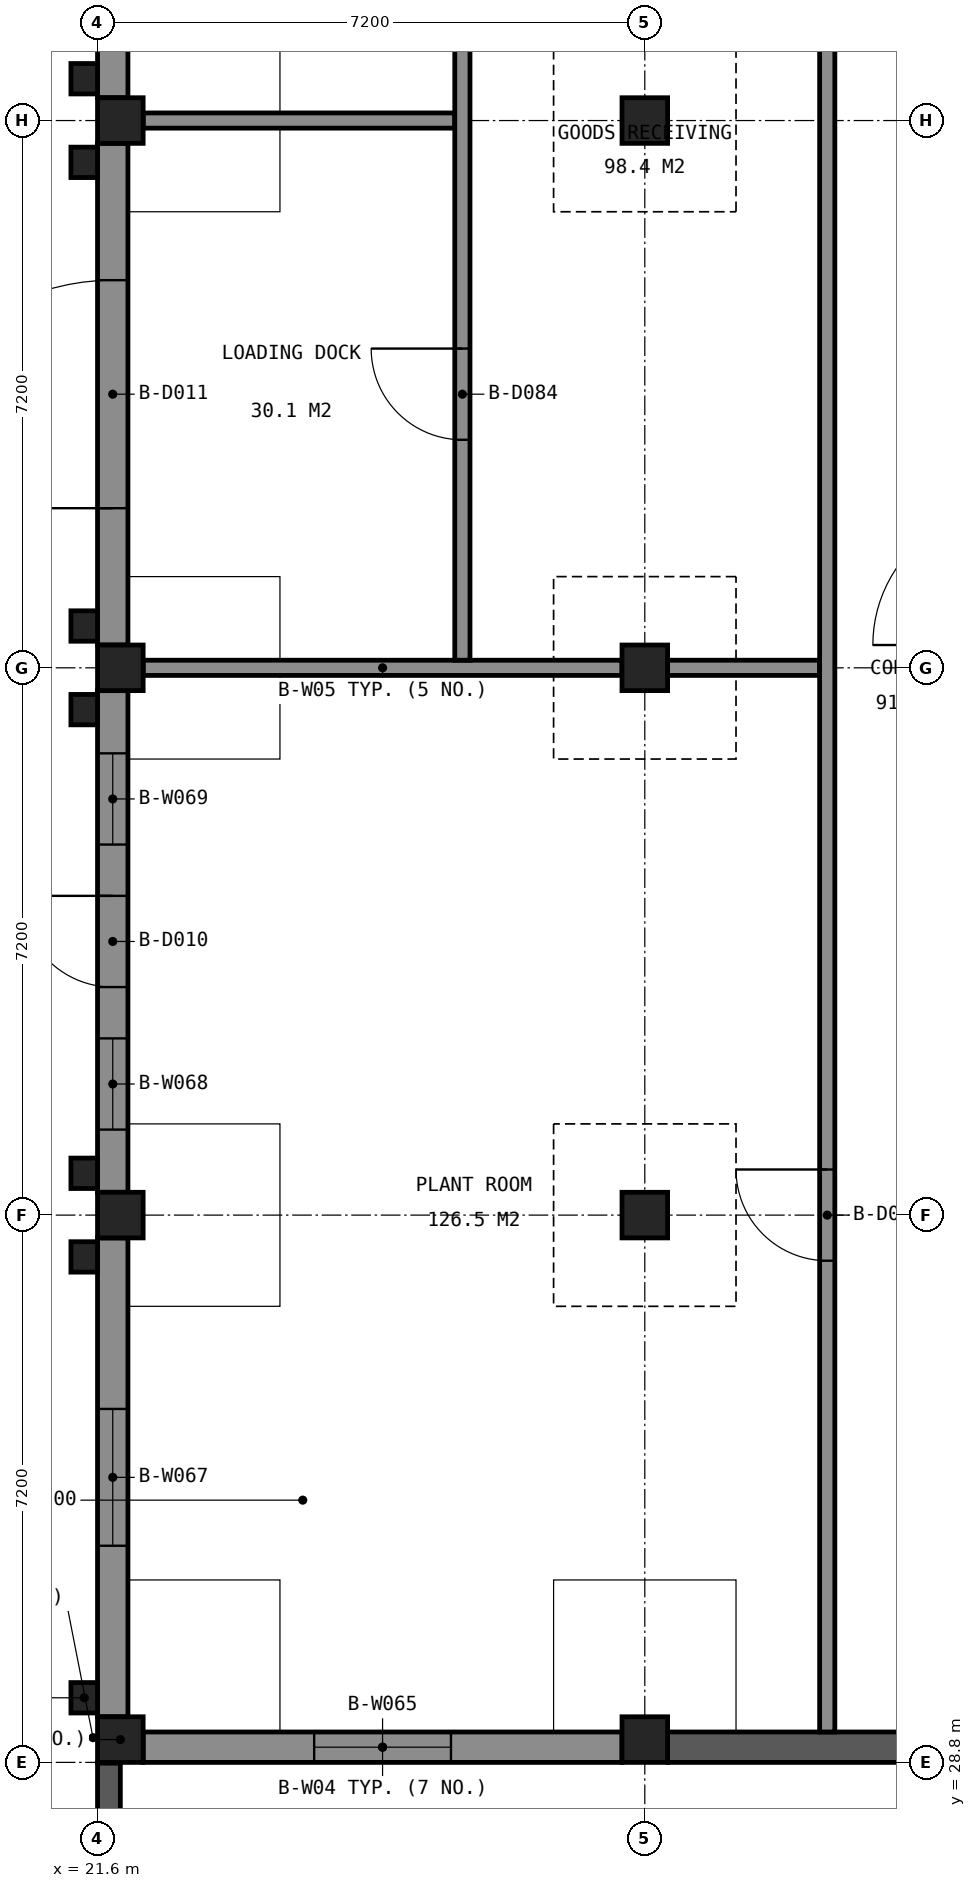
"""IFC4 building model, lengths in metres.
Left out: names, types, materials, properties, quantities, classifications, styles, units other than length and angle.
Written with IfcOpenShell. Run it as: python <this file> out.ifc"""

import sys

from ifc_helpers import new_model, si_unit, direction, frame, frame_2d, origin, origin_2d, place, context, subcontext, project, spatial, rectangle, extrude, element, fill, save


model = new_model("IFC4")
c1 = context("Model", 3, precision=1e-05, world=origin(), true_north=direction((0.0, 1.0)))
c2 = subcontext(c1, "Body", "Model", "MODEL_VIEW")
j1 = project(units=[si_unit("LENGTHUNIT", "METRE"), si_unit("PLANEANGLEUNIT", "RADIAN")], contexts=[c1])
p1 = place(None, origin())
s1 = spatial("IfcSite", under=j1, at=p1, CompositionType="ELEMENT")
p2 = place(p1, origin())
s2 = spatial("IfcBuilding", under=s1, at=p2, CompositionType="ELEMENT")
p3 = place(p2, origin())
s3 = spatial("IfcBuildingStorey", under=s2, at=p3, CompositionType="ELEMENT", Elevation=0.0)
for number, where, z_axis, x_axis in (
    (1, (21.9, 29.1, 0.0), (0.0, 0.0, 1.0), (1.0, 0.0, 0.0)),
    (2, (21.9, 36.0, 0.0), (0.0, 0.0, 1.0), (1.0, 0.0, 0.0)),
    (3, (21.9, 43.2, 0.0), (0.0, 0.0, 1.0), (1.0, 0.0, 0.0)),
    (4, (21.9, 50.4, 0.0), (0.0, 0.0, 1.0), (1.0, 0.0, 0.0)),
    (5, (28.8, 29.1, 0.0), (0.0, 0.0, 1.0), (1.0, 0.0, 0.0)),
    (6, (28.8, 36.0, 0.0), (0.0, 0.0, 1.0), (1.0, 0.0, 0.0)),
    (7, (28.8, 43.2, 0.0), (0.0, 0.0, 1.0), (1.0, 0.0, 0.0)),
    (8, (28.8, 50.4, 0.0), (0.0, 0.0, 1.0), (1.0, 0.0, 0.0)),
):
    element("IfcColumn", number, at=place(p3, frame(where, z_axis=z_axis, x_axis=x_axis)), inside=s3, PredefinedType="COLUMN", context=c2, shape_type="SweptSolid", body=[
        extrude(rectangle(XDim=0.6, YDim=0.6, at=origin_2d()), origin(), (0.0, 0.0, 1.0), 4.8),
    ])
p4 = place(p3, frame((29.1, 29.0, 0.0), z_axis=(0.0, 0.0, 1.0), x_axis=(1.0, 0.0, 0.0)))
e9 = element("IfcWall", 9, at=p4, inside=s3, PredefinedType="SHEAR", context=c2, shape_type="SweptSolid", body=[
    extrude(rectangle(XDim=13.7, YDim=0.4, at=frame_2d((6.85, 0.0))), origin(), (0.0, 0.0, 1.0), 4.55),
])
p5 = place(p3, frame((21.75, 21.6, -0.25), z_axis=(0.0, 0.0, 1.0), x_axis=(0.0, 1.0, 0.0)))
e10 = element("IfcWall", 10, at=p5, inside=s3, PredefinedType="SOLIDWALL", context=c2, shape_type="SweptSolid", body=[
    extrude(rectangle(XDim=7.19, YDim=0.3, at=frame_2d((3.595, 0.0))), origin(), (0.0, 0.0, 1.0), 6.15),
])
p6 = place(p3, frame((22.2, 29.0, 0.0), z_axis=(0.0, 0.0, 1.0), x_axis=(1.0, 0.0, 0.0)))
e11 = element("IfcWall", 11, at=p6, inside=s3, PredefinedType="SOLIDWALL", context=c2, shape_type="SweptSolid", body=[
    extrude(rectangle(XDim=6.3, YDim=0.4, at=frame_2d((3.15, 0.0))), origin(), (0.0, 0.0, 1.0), 3.95),
])
p7 = place(p6, frame((2.25, 0.0, 2.0)))
e12 = element("IfcOpeningElement", 12, at=p7, cuts=e11, PredefinedType="OPENING", context=c2, shape_type="SweptSolid", body=[
    extrude(rectangle(XDim=1.8, YDim=1.5, at=frame_2d((0.9, 0.75))), frame((0.0, 0.21, 0.0), z_axis=(0.0, -1.0, 0.0), x_axis=(1.0, 0.0, 0.0)), (0.0, 0.0, 1.0), 0.42),
])
p8 = place(p3, frame((21.8, 29.4, 0.0), z_axis=(0.0, 0.0, 1.0), x_axis=(0.0, 1.0, 0.0)))
e13 = element("IfcWall", 13, at=p8, inside=s3, PredefinedType="SOLIDWALL", context=c2, shape_type="SweptSolid", body=[
    extrude(rectangle(XDim=6.3, YDim=0.4, at=frame_2d((3.15, 0.0))), origin(), (0.0, 0.0, 1.0), 3.95),
])
p9 = place(p8, frame((2.25, 0.0, 2.0)))
e14 = element("IfcOpeningElement", 14, at=p9, cuts=e13, PredefinedType="OPENING", context=c2, shape_type="SweptSolid", body=[
    extrude(rectangle(XDim=1.8, YDim=1.5, at=frame_2d((0.9, 0.75))), frame((0.0, 0.21, 0.0), z_axis=(0.0, -1.0, 0.0), x_axis=(1.0, 0.0, 0.0)), (0.0, 0.0, 1.0), 0.42),
])
p10 = place(p3, frame((21.8, 36.3, 0.0), z_axis=(0.0, 0.0, 1.0), x_axis=(0.0, 1.0, 0.0)))
e15 = element("IfcWall", 15, at=p10, inside=s3, PredefinedType="SOLIDWALL", context=c2, shape_type="SweptSolid", body=[
    extrude(rectangle(XDim=6.6, YDim=0.4, at=frame_2d((3.3, 0.0))), origin(), (0.0, 0.0, 1.0), 3.95),
])
p11 = place(p10, frame((2.7, 0.0, 0.0)))
e16 = element("IfcOpeningElement", 16, at=p11, cuts=e15, PredefinedType="OPENING", context=c2, shape_type="SweptSolid", body=[
    extrude(rectangle(XDim=1.2, YDim=2.1, at=frame_2d((0.6, 1.05))), frame((0.0, 0.21, 0.0), z_axis=(0.0, -1.0, 0.0), x_axis=(1.0, 0.0, 0.0)), (0.0, 0.0, 1.0), 0.42),
])
p12 = place(p10, frame((0.825, 0.0, 2.0)))
e17 = element("IfcOpeningElement", 17, at=p12, cuts=e15, PredefinedType="OPENING", context=c2, shape_type="SweptSolid", body=[
    extrude(rectangle(XDim=1.2, YDim=1.5, at=frame_2d((0.6, 0.75))), frame((0.0, 0.21, 0.0), z_axis=(0.0, -1.0, 0.0), x_axis=(1.0, 0.0, 0.0)), (0.0, 0.0, 1.0), 0.42),
])
p13 = place(p10, frame((4.575, 0.0, 2.0)))
e18 = element("IfcOpeningElement", 18, at=p13, cuts=e15, PredefinedType="OPENING", context=c2, shape_type="SweptSolid", body=[
    extrude(rectangle(XDim=1.2, YDim=1.5, at=frame_2d((0.6, 0.75))), frame((0.0, 0.21, 0.0), z_axis=(0.0, -1.0, 0.0), x_axis=(1.0, 0.0, 0.0)), (0.0, 0.0, 1.0), 0.42),
])
p14 = place(p3, frame((21.8, 43.5, 0.0), z_axis=(0.0, 0.0, 1.0), x_axis=(0.0, 1.0, 0.0)))
e19 = element("IfcWall", 19, at=p14, inside=s3, PredefinedType="SOLIDWALL", context=c2, shape_type="SweptSolid", body=[
    extrude(rectangle(XDim=6.6, YDim=0.4, at=frame_2d((3.3, 0.0))), origin(), (0.0, 0.0, 1.0), 3.95),
])
p15 = place(p14, frame((1.8, 0.0, 0.0)))
e20 = element("IfcOpeningElement", 20, at=p15, cuts=e19, PredefinedType="OPENING", context=c2, shape_type="SweptSolid", body=[
    extrude(rectangle(XDim=3.0, YDim=3.0, at=frame_2d((1.5, 1.5))), frame((0.0, 0.21, 0.0), z_axis=(0.0, -1.0, 0.0), x_axis=(1.0, 0.0, 0.0)), (0.0, 0.0, 1.0), 0.42),
])
p16 = place(p3, frame((21.8, 50.7, 0.0), z_axis=(0.0, 0.0, 1.0), x_axis=(0.0, 1.0, 0.0)))
e21 = element("IfcWall", 21, at=p16, inside=s3, PredefinedType="SOLIDWALL", context=c2, shape_type="SweptSolid", body=[
    extrude(rectangle(XDim=6.6, YDim=0.4, at=frame_2d((3.3, 0.0))), origin(), (0.0, 0.0, 1.0), 3.95),
])
p17 = place(p16, frame((1.8, 0.0, 0.0)))
e22 = element("IfcOpeningElement", 22, at=p17, cuts=e21, PredefinedType="OPENING", context=c2, shape_type="SweptSolid", body=[
    extrude(rectangle(XDim=3.0, YDim=3.0, at=frame_2d((1.5, 1.5))), frame((0.0, 0.21, 0.0), z_axis=(0.0, -1.0, 0.0), x_axis=(1.0, 0.0, 0.0)), (0.0, 0.0, 1.0), 0.42),
])
for number, where, z_axis, x_axis in (
    (23, (21.425, 29.65, -0.25), (0.0, 0.0, 1.0), (1.0, 0.0, 0.0)),
    (24, (21.425, 35.45, -0.25), (0.0, 0.0, 1.0), (1.0, 0.0, 0.0)),
    (25, (21.425, 36.55, -0.25), (0.0, 0.0, 1.0), (1.0, 0.0, 0.0)),
    (26, (21.425, 42.65, -0.25), (0.0, 0.0, 1.0), (1.0, 0.0, 0.0)),
    (27, (21.425, 43.75, -0.25), (0.0, 0.0, 1.0), (1.0, 0.0, 0.0)),
    (28, (21.425, 49.85, -0.25), (0.0, 0.0, 1.0), (1.0, 0.0, 0.0)),
    (29, (21.425, 50.95, -0.25), (0.0, 0.0, 1.0), (1.0, 0.0, 0.0)),
):
    element("IfcColumn", number, at=place(p3, frame(where, z_axis=z_axis, x_axis=x_axis)), inside=s3, PredefinedType="COLUMN", context=c2, shape_type="SweptSolid", body=[
        extrude(rectangle(XDim=0.35, YDim=0.4, at=origin_2d()), origin(), (0.0, 0.0, 1.0), 5.05),
    ])
p18 = place(p3, frame((21.54, 28.8, 0.0), z_axis=(0.0, 0.0, 1.0), x_axis=(0.0, 1.0, 0.0)))
e30 = element("IfcWall", 30, at=p18, inside=s3, PredefinedType="SOLIDWALL", context=c2, shape_type="SweptSolid", body=[
    extrude(rectangle(XDim=0.65, YDim=0.12, at=frame_2d((0.325, 0.0))), origin(), (0.0, 0.0, 1.0), 0.6),
])
p19 = place(p3, frame((21.54, 29.85, 0.0), z_axis=(0.0, 0.0, 1.0), x_axis=(0.0, 1.0, 0.0)))
e31 = element("IfcWall", 31, at=p19, inside=s3, PredefinedType="SOLIDWALL", context=c2, shape_type="SweptSolid", body=[
    extrude(rectangle(XDim=5.4, YDim=0.12, at=frame_2d((2.7, 0.0))), origin(), (0.0, 0.0, 1.0), 0.6),
])
p20 = place(p3, frame((21.54, 35.65, 0.0), z_axis=(0.0, 0.0, 1.0), x_axis=(0.0, 1.0, 0.0)))
e32 = element("IfcWall", 32, at=p20, inside=s3, PredefinedType="SOLIDWALL", context=c2, shape_type="SweptSolid", body=[
    extrude(rectangle(XDim=0.7, YDim=0.12, at=frame_2d((0.35, 0.0))), origin(), (0.0, 0.0, 1.0), 0.6),
])
for number, where, z_axis, x_axis in (
    (33, (21.54, 36.75, 0.0), (0.0, 0.0, 1.0), (0.0, 1.0, 0.0)),
    (34, (21.54, 40.3, 0.0), (0.0, 0.0, 1.0), (0.0, 1.0, 0.0)),
):
    element("IfcWall", number, at=place(p3, frame(where, z_axis=z_axis, x_axis=x_axis)), inside=s3, PredefinedType="SOLIDWALL", context=c2, shape_type="SweptSolid", body=[
        extrude(rectangle(XDim=2.15, YDim=0.12, at=frame_2d((1.075, 0.0))), origin(), (0.0, 0.0, 1.0), 0.6),
    ])
p21 = place(p3, frame((21.54, 42.85, 0.0), z_axis=(0.0, 0.0, 1.0), x_axis=(0.0, 1.0, 0.0)))
e35 = element("IfcWall", 35, at=p21, inside=s3, PredefinedType="SOLIDWALL", context=c2, shape_type="SweptSolid", body=[
    extrude(rectangle(XDim=0.7, YDim=0.12, at=frame_2d((0.35, 0.0))), origin(), (0.0, 0.0, 1.0), 0.6),
])
for number, where, z_axis, x_axis in (
    (36, (21.54, 43.95, 0.0), (0.0, 0.0, 1.0), (0.0, 1.0, 0.0)),
    (37, (21.54, 48.4, 0.0), (0.0, 0.0, 1.0), (0.0, 1.0, 0.0)),
):
    element("IfcWall", number, at=place(p3, frame(where, z_axis=z_axis, x_axis=x_axis)), inside=s3, PredefinedType="SOLIDWALL", context=c2, shape_type="SweptSolid", body=[
        extrude(rectangle(XDim=1.25, YDim=0.12, at=frame_2d((0.625, 0.0))), origin(), (0.0, 0.0, 1.0), 0.6),
    ])
p22 = place(p3, frame((21.54, 50.05, 0.0), z_axis=(0.0, 0.0, 1.0), x_axis=(0.0, 1.0, 0.0)))
e38 = element("IfcWall", 38, at=p22, inside=s3, PredefinedType="SOLIDWALL", context=c2, shape_type="SweptSolid", body=[
    extrude(rectangle(XDim=0.7, YDim=0.12, at=frame_2d((0.35, 0.0))), origin(), (0.0, 0.0, 1.0), 0.6),
])
p23 = place(p3, frame((21.54, 51.15, 0.0), z_axis=(0.0, 0.0, 1.0), x_axis=(0.0, 1.0, 0.0)))
e39 = element("IfcWall", 39, at=p23, inside=s3, PredefinedType="SOLIDWALL", context=c2, shape_type="SweptSolid", body=[
    extrude(rectangle(XDim=1.25, YDim=0.12, at=frame_2d((0.625, 0.0))), origin(), (0.0, 0.0, 1.0), 0.6),
])
p24 = place(p3, frame((22.2, 43.2, 0.0), z_axis=(0.0, 0.0, 1.0), x_axis=(1.0, 0.0, 0.0)))
e40 = element("IfcWall", 40, at=p24, inside=s3, PredefinedType="PARTITIONING", context=c2, shape_type="SweptSolid", body=[
    extrude(rectangle(XDim=6.3, YDim=0.2, at=frame_2d((3.15, 0.0))), origin(), (0.0, 0.0, 1.0), 3.95),
])
p25 = place(p3, frame((29.1, 43.2, 0.0), z_axis=(0.0, 0.0, 1.0), x_axis=(1.0, 0.0, 0.0)))
e41 = element("IfcWall", 41, at=p25, inside=s3, PredefinedType="PARTITIONING", context=c2, shape_type="SweptSolid", body=[
    extrude(rectangle(XDim=2.0, YDim=0.2, at=frame_2d((1.0, 0.0))), origin(), (0.0, 0.0, 1.0), 3.95),
])
p26 = place(p3, frame((22.2, 50.4, 0.0), z_axis=(0.0, 0.0, 1.0), x_axis=(1.0, 0.0, 0.0)))
e42 = element("IfcWall", 42, at=p26, inside=s3, PredefinedType="PARTITIONING", context=c2, shape_type="SweptSolid", body=[
    extrude(rectangle(XDim=4.1, YDim=0.2, at=frame_2d((2.05, 0.0))), origin(), (0.0, 0.0, 1.0), 3.95),
])
p27 = place(p3, frame((26.4, 43.3, 0.0), z_axis=(0.0, 0.0, 1.0), x_axis=(0.0, 1.0, 0.0)))
e43 = element("IfcWall", 43, at=p27, inside=s3, PredefinedType="PARTITIONING", context=c2, shape_type="SweptSolid", body=[
    extrude(rectangle(XDim=21.4, YDim=0.2, at=frame_2d((10.7, 0.0))), origin(), (0.0, 0.0, 1.0), 3.95),
])
p28 = place(p27, frame((2.9, 0.0, 0.0)))
e44 = element("IfcOpeningElement", 44, at=p28, cuts=e43, PredefinedType="OPENING", context=c2, shape_type="SweptSolid", body=[
    extrude(rectangle(XDim=1.2, YDim=2.1, at=frame_2d((0.6, 1.05))), frame((0.0, 0.11, 0.0), z_axis=(0.0, -1.0, 0.0), x_axis=(1.0, 0.0, 0.0)), (0.0, 0.0, 1.0), 0.22),
])
p29 = place(p27, frame((10.1, 0.0, 0.0)))
e45 = element("IfcOpeningElement", 45, at=p29, cuts=e43, PredefinedType="OPENING", context=c2, shape_type="SweptSolid", body=[
    extrude(rectangle(XDim=1.2, YDim=2.1, at=frame_2d((0.6, 1.05))), frame((0.0, 0.11, 0.0), z_axis=(0.0, -1.0, 0.0), x_axis=(1.0, 0.0, 0.0)), (0.0, 0.0, 1.0), 0.22),
])
p30 = place(p27, frame((17.3, 0.0, 0.0)))
e46 = element("IfcOpeningElement", 46, at=p30, cuts=e43, PredefinedType="OPENING", context=c2, shape_type="SweptSolid", body=[
    extrude(rectangle(XDim=1.2, YDim=2.1, at=frame_2d((0.6, 1.05))), frame((0.0, 0.11, 0.0), z_axis=(0.0, -1.0, 0.0), x_axis=(1.0, 0.0, 0.0)), (0.0, 0.0, 1.0), 0.22),
])
p31 = place(p3, frame((31.2, 29.2, 0.0), z_axis=(0.0, 0.0, 1.0), x_axis=(0.0, 1.0, 0.0)))
e47 = element("IfcWall", 47, at=p31, inside=s3, PredefinedType="PARTITIONING", context=c2, shape_type="SweptSolid", body=[
    extrude(rectangle(XDim=42.4, YDim=0.2, at=frame_2d((21.2, 0.0))), origin(), (0.0, 0.0, 1.0), 3.95),
])
p32 = place(p31, frame((6.2, 0.0, 0.0)))
e48 = element("IfcOpeningElement", 48, at=p32, cuts=e47, PredefinedType="OPENING", context=c2, shape_type="SweptSolid", body=[
    extrude(rectangle(XDim=1.2, YDim=2.1, at=frame_2d((0.6, 1.05))), frame((0.0, 0.11, 0.0), z_axis=(0.0, -1.0, 0.0), x_axis=(1.0, 0.0, 0.0)), (0.0, 0.0, 1.0), 0.22),
])
p33 = place(p31, frame((23.9, 0.0, 0.0)))
e49 = element("IfcOpeningElement", 49, at=p33, cuts=e47, PredefinedType="OPENING", context=c2, shape_type="SweptSolid", body=[
    extrude(rectangle(XDim=1.8, YDim=2.1, at=frame_2d((0.9, 1.05))), frame((0.0, 0.11, 0.0), z_axis=(0.0, -1.0, 0.0), x_axis=(1.0, 0.0, 0.0)), (0.0, 0.0, 1.0), 0.22),
])
p34 = place(p31, frame((38.7, 0.0, 0.0)))
e50 = element("IfcOpeningElement", 50, at=p34, cuts=e47, PredefinedType="OPENING", context=c2, shape_type="SweptSolid", body=[
    extrude(rectangle(XDim=1.0, YDim=2.1, at=frame_2d((0.5, 1.05))), frame((0.0, 0.11, 0.0), z_axis=(0.0, -1.0, 0.0), x_axis=(1.0, 0.0, 0.0)), (0.0, 0.0, 1.0), 0.22),
])
p35 = place(p11, origin())
e51 = element("IfcDoor", 51, at=p35, inside=s3, OperationType="SINGLE_SWING_RIGHT", PredefinedType="DOOR", context=c2, shape_type="SweptSolid", body=[
    extrude(rectangle(XDim=1.2, YDim=2.1, at=frame_2d((0.6, 1.05))), frame((0.0, 0.025, 0.0), z_axis=(0.0, -1.0, 0.0), x_axis=(1.0, 0.0, 0.0)), (0.0, 0.0, 1.0), 0.05),
])
fill(e16, e51)
p36 = place(p15, origin())
e52 = element("IfcDoor", 52, at=p36, inside=s3, OperationType="ROLLINGUP", PredefinedType="DOOR", context=c2, shape_type="SweptSolid", body=[
    extrude(rectangle(XDim=3.0, YDim=3.0, at=frame_2d((1.5, 1.5))), frame((0.0, 0.025, 0.0), z_axis=(0.0, -1.0, 0.0), x_axis=(1.0, 0.0, 0.0)), (0.0, 0.0, 1.0), 0.05),
])
fill(e20, e52)
p37 = place(p7, origin())
e53 = element("IfcWindow", 53, at=p37, inside=s3, PartitioningType="SINGLE_PANEL", PredefinedType="WINDOW", context=c2, shape_type="SweptSolid", body=[
    extrude(rectangle(XDim=1.8, YDim=1.5, at=frame_2d((0.9, 0.75))), frame((0.0, 0.03, 0.0), z_axis=(0.0, -1.0, 0.0), x_axis=(1.0, 0.0, 0.0)), (0.0, 0.0, 1.0), 0.06),
])
fill(e12, e53)
p38 = place(p9, origin())
e54 = element("IfcWindow", 54, at=p38, inside=s3, PartitioningType="SINGLE_PANEL", PredefinedType="WINDOW", context=c2, shape_type="SweptSolid", body=[
    extrude(rectangle(XDim=1.8, YDim=1.5, at=frame_2d((0.9, 0.75))), frame((0.0, 0.03, 0.0), z_axis=(0.0, -1.0, 0.0), x_axis=(1.0, 0.0, 0.0)), (0.0, 0.0, 1.0), 0.06),
])
fill(e14, e54)
p39 = place(p12, origin())
e55 = element("IfcWindow", 55, at=p39, inside=s3, PartitioningType="SINGLE_PANEL", PredefinedType="WINDOW", context=c2, shape_type="SweptSolid", body=[
    extrude(rectangle(XDim=1.2, YDim=1.5, at=frame_2d((0.6, 0.75))), frame((0.0, 0.03, 0.0), z_axis=(0.0, -1.0, 0.0), x_axis=(1.0, 0.0, 0.0)), (0.0, 0.0, 1.0), 0.06),
])
fill(e17, e55)
p40 = place(p13, origin())
e56 = element("IfcWindow", 56, at=p40, inside=s3, PartitioningType="SINGLE_PANEL", PredefinedType="WINDOW", context=c2, shape_type="SweptSolid", body=[
    extrude(rectangle(XDim=1.2, YDim=1.5, at=frame_2d((0.6, 0.75))), frame((0.0, 0.03, 0.0), z_axis=(0.0, -1.0, 0.0), x_axis=(1.0, 0.0, 0.0)), (0.0, 0.0, 1.0), 0.06),
])
fill(e18, e56)
p41 = place(p32, origin())
e57 = element("IfcDoor", 57, at=p41, inside=s3, OperationType="SINGLE_SWING_RIGHT", PredefinedType="DOOR", context=c2, shape_type="SweptSolid", body=[
    extrude(rectangle(XDim=1.2, YDim=2.1, at=frame_2d((0.6, 1.05))), frame((0.0, 0.025, 0.0), z_axis=(0.0, -1.0, 0.0), x_axis=(1.0, 0.0, 0.0)), (0.0, 0.0, 1.0), 0.05),
])
fill(e48, e57)
p42 = place(p28, origin())
e58 = element("IfcDoor", 58, at=p42, inside=s3, OperationType="SINGLE_SWING_RIGHT", PredefinedType="DOOR", context=c2, shape_type="SweptSolid", body=[
    extrude(rectangle(XDim=1.2, YDim=2.1, at=frame_2d((0.6, 1.05))), frame((0.0, 0.025, 0.0), z_axis=(0.0, -1.0, 0.0), x_axis=(1.0, 0.0, 0.0)), (0.0, 0.0, 1.0), 0.05),
])
fill(e44, e58)
save(model, sys.argv[1])
